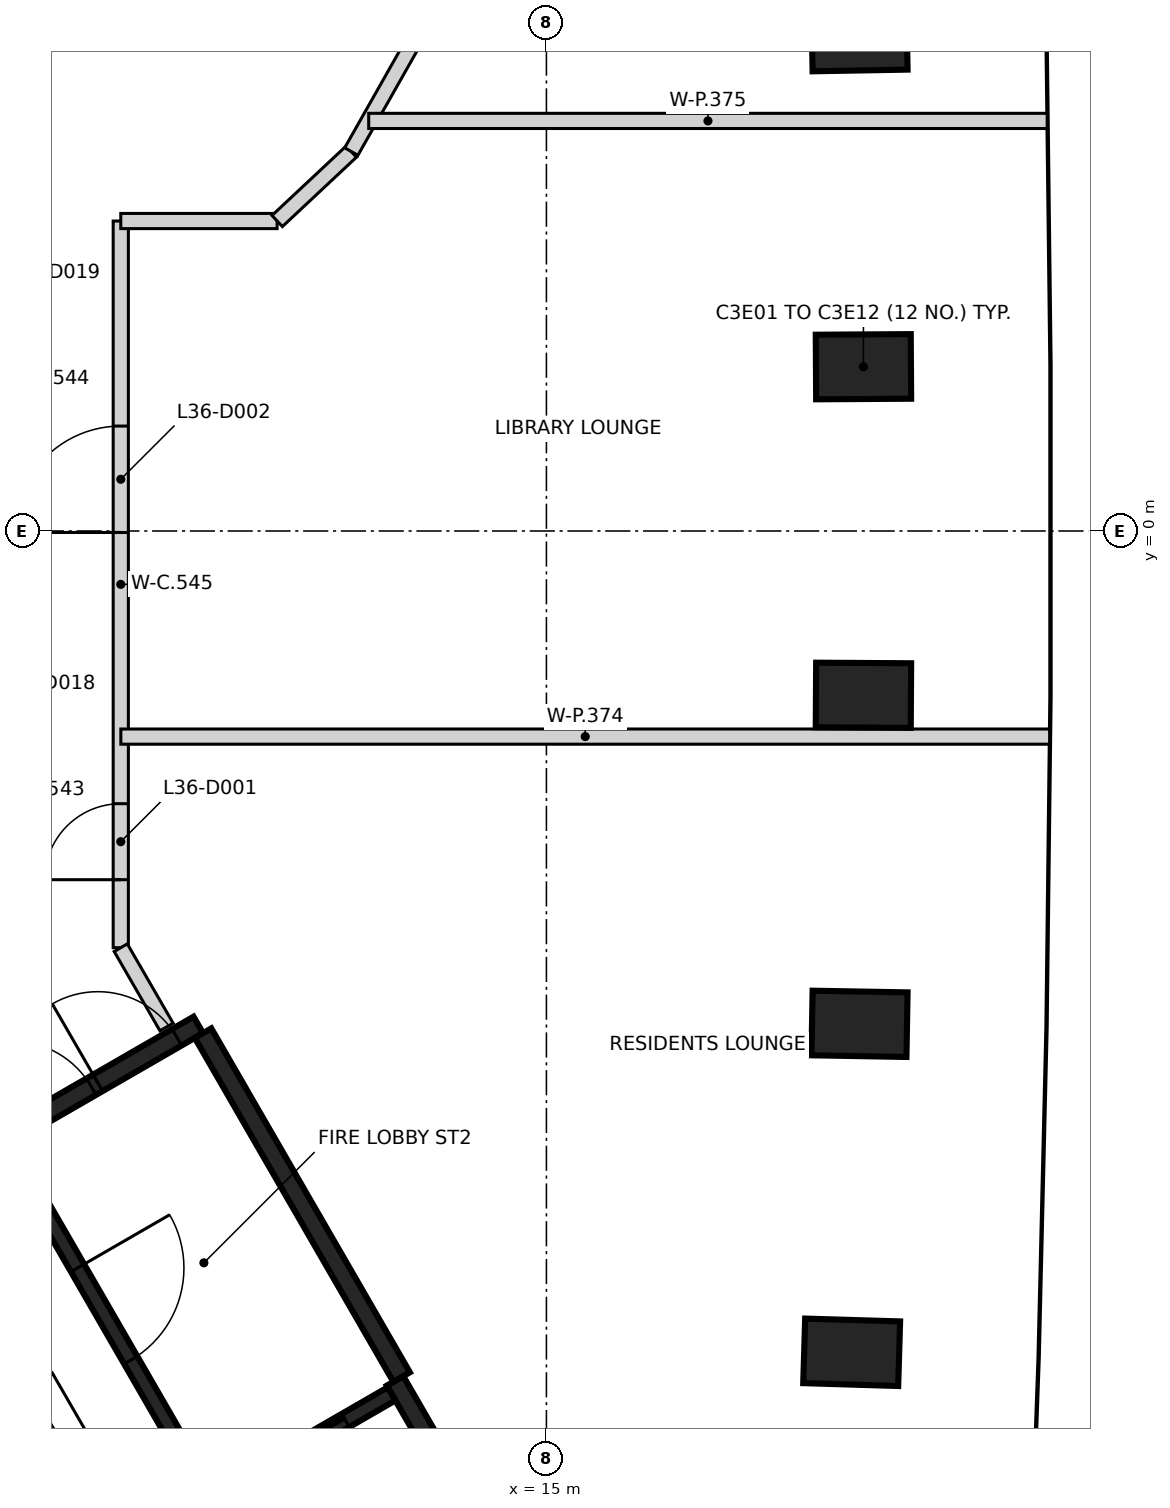
"""IFC4 building model, lengths in metres.
Left out: names, types, materials, properties, quantities, classifications, styles, units other than length and angle.
Written with IfcOpenShell. Run it as: python <this file> out.ifc"""

import sys

from ifc_helpers import new_model, si_unit, direction, frame, frame_2d, origin, origin_2d, place, context, subcontext, project, spatial, rectangle, extrude, element, fill, save


model = new_model("IFC4")
c1 = context("Model", 3, precision=1e-05, world=origin(), true_north=direction((0.0, 1.0)))
c2 = subcontext(c1, "Body", "Model", "MODEL_VIEW")
j1 = project(units=[si_unit("LENGTHUNIT", "METRE"), si_unit("PLANEANGLEUNIT", "RADIAN")], contexts=[c1])
p1 = place(None, origin())
s1 = spatial("IfcSite", under=j1, at=p1, CompositionType="ELEMENT")
p2 = place(p1, origin())
s2 = spatial("IfcBuilding", under=s1, at=p2, CompositionType="ELEMENT")
p3 = place(p2, frame((0.0, 0.0, 146.8)))
s3 = spatial("IfcBuildingStorey", under=s2, at=p3, CompositionType="ELEMENT", Elevation=146.8)
for number, where, z_axis, x_axis in (
    (1, (19.016, -10.805, -0.4), (0.0, 0.0, 1.0), (-1.0, 0.03, 0.0)),
    (2, (19.119, -6.484, -0.4), (0.0, 0.0, 1.0), (-1.0, 0.018, 0.0)),
    (3, (19.171, -2.161, -0.4), (0.0, 0.0, 1.0), (-1.0, 0.006, 0.0)),
    (4, (19.171, 2.161, -0.4), (0.0, 0.0, 1.0), (1.0, 0.006, 0.0)),
    (5, (19.119, 6.484, -0.4), (0.0, 0.0, 1.0), (1.0, 0.018, 0.0)),
):
    element("IfcColumn", number, at=place(p3, frame(where, z_axis=z_axis, x_axis=x_axis)), inside=s3, PredefinedType="COLUMN", context=c2, shape_type="SweptSolid", body=[
        extrude(rectangle(XDim=1.25, YDim=0.85, at=origin_2d()), origin(), (0.0, 0.0, 1.0), 3.6),
    ])
p4 = place(p3, frame((0.417, -12.273, 0.0), z_axis=(0.0, 0.0, 1.0), x_axis=(0.866021906294, 0.500006057782, 0.0)))
e6 = element("IfcWall", 6, at=p4, inside=s3, PredefinedType="SHEAR", context=c2, shape_type="SweptSolid", body=[
    extrude(rectangle(XDim=11.55, YDim=0.25, at=frame_2d((5.775, 0.0))), origin(), (0.0, 0.0, 1.0), 3.2),
])
p5 = place(p4, frame((10.025, 0.0, 0.0)))
e7 = element("IfcOpeningElement", 7, at=p5, cuts=e6, PredefinedType="OPENING", context=c2, shape_type="SweptSolid", body=[
    extrude(rectangle(XDim=1.2, YDim=2.1, at=frame_2d((0.6, 1.05))), frame((0.0, 0.135, 0.0), z_axis=(0.0, -1.0, 0.0), x_axis=(1.0, 0.0, 0.0)), (0.0, 0.0, 1.0), 0.27),
])
p6 = place(p4, frame((8.725, 0.0, 0.0)))
e8 = element("IfcOpeningElement", 8, at=p6, cuts=e6, PredefinedType="OPENING", context=c2, shape_type="SweptSolid", body=[
    extrude(rectangle(XDim=1.2, YDim=2.1, at=frame_2d((0.6, 1.05))), frame((0.0, 0.135, 0.0), z_axis=(0.0, -1.0, 0.0), x_axis=(1.0, 0.0, 0.0)), (0.0, 0.0, 1.0), 0.27),
])
p7 = place(p3, frame((13.008, -11.181, 0.0), z_axis=(0.0, 0.0, 1.0), x_axis=(0.500004234368, -0.866022959057, 0.0)))
e9 = element("IfcWall", 9, at=p7, inside=s3, PredefinedType="SHEAR", context=c2, shape_type="SweptSolid", body=[
    extrude(rectangle(XDim=6.25, YDim=0.25, at=frame_2d((3.125, 0.0))), origin(), (0.0, 0.0, 1.0), 3.2),
])
p8 = place(p3, frame((10.483, -6.606, 0.0), z_axis=(0.0, 0.0, 1.0), x_axis=(0.49999885962, -0.866026062182, 0.0)))
e10 = element("IfcWall", 10, at=p8, inside=s3, PredefinedType="SHEAR", context=c2, shape_type="SweptSolid", body=[
    extrude(rectangle(XDim=5.225, YDim=0.25, at=frame_2d((2.612, 0.0))), origin(), (0.0, 0.0, 1.0), 3.2),
])
p9 = place(p3, frame((7.906, -8.094, 0.0), z_axis=(0.0, 0.0, 1.0), x_axis=(0.500024287448, -0.866011380966, 0.0)))
e11 = element("IfcWall", 11, at=p9, inside=s3, PredefinedType="SHEAR", context=c2, shape_type="SweptSolid", body=[
    extrude(rectangle(XDim=5.251, YDim=0.2, at=frame_2d((2.625, 0.0))), origin(), (0.0, 0.0, 1.0), 3.2),
])
p10 = place(p9, frame((1.849, 0.0, 0.0)))
e12 = element("IfcOpeningElement", 12, at=p10, cuts=e11, PredefinedType="OPENING", context=c2, shape_type="SweptSolid", body=[
    extrude(rectangle(XDim=1.4, YDim=2.1, at=frame_2d((0.7, 1.05))), frame((0.0, 0.11, 0.0), z_axis=(0.0, -1.0, 0.0), x_axis=(1.0, 0.0, 0.0)), (0.0, 0.0, 1.0), 0.22),
])
p11 = place(p3, frame((10.587, -12.723, 0.0), z_axis=(0.0, 0.0, 1.0), x_axis=(0.866037306777, 0.499979382845, 0.0)))
e13 = element("IfcWall", 13, at=p11, inside=s3, PredefinedType="SHEAR", context=c2, shape_type="SweptSolid", body=[
    extrude(rectangle(XDim=2.742, YDim=0.2, at=frame_2d((1.371, 0.0))), origin(), (0.0, 0.0, 1.0), 3.2),
])
p12 = place(p11, frame((0.743, 0.0, 0.0)))
e14 = element("IfcOpeningElement", 14, at=p12, cuts=e13, PredefinedType="OPENING", context=c2, shape_type="SweptSolid", body=[
    extrude(rectangle(XDim=1.3, YDim=2.1, at=frame_2d((0.65, 1.05))), frame((0.0, 0.11, 0.0), z_axis=(0.0, -1.0, 0.0), x_axis=(1.0, 0.0, 0.0)), (0.0, 0.0, 1.0), 0.22),
])
p13 = place(p3, frame((9.4, -5.482, 0.0), z_axis=(0.0, 0.0, 1.0), x_axis=(0.0, 1.0, 0.0)))
e15 = element("IfcWall", 15, at=p13, inside=s3, PredefinedType="PARTITIONING", context=c2, shape_type="SweptSolid", body=[
    extrude(rectangle(XDim=9.56, YDim=0.2, at=frame_2d((4.78, 0.0))), origin(), (0.0, 0.0, 1.0), 3.2),
])
p14 = place(p13, frame((0.895, 0.0, 0.0)))
e16 = element("IfcOpeningElement", 16, at=p14, cuts=e15, PredefinedType="OPENING", context=c2, shape_type="SweptSolid", body=[
    extrude(rectangle(XDim=1.0, YDim=2.1, at=frame_2d((0.5, 1.05))), frame((0.0, 0.11, 0.0), z_axis=(0.0, -1.0, 0.0), x_axis=(1.0, 0.0, 0.0)), (0.0, 0.0, 1.0), 0.22),
])
p15 = place(p13, frame((5.462, 0.0, 0.0)))
e17 = element("IfcOpeningElement", 17, at=p15, cuts=e15, PredefinedType="OPENING", context=c2, shape_type="SweptSolid", body=[
    extrude(rectangle(XDim=1.4, YDim=2.1, at=frame_2d((0.7, 1.05))), frame((0.0, 0.11, 0.0), z_axis=(0.0, -1.0, 0.0), x_axis=(1.0, 0.0, 0.0)), (0.0, 0.0, 1.0), 0.22),
])
p16 = place(p3, frame((9.4, -5.482, 0.0), z_axis=(0.0, 0.0, 1.0), x_axis=(0.499909562097, -0.866077611837, 0.0)))
e18 = element("IfcWall", 18, at=p16, inside=s3, PredefinedType="PARTITIONING", context=c2, shape_type="SweptSolid", body=[
    extrude(rectangle(XDim=1.205, YDim=0.2, at=frame_2d((0.603, 0.0))), origin(), (0.0, 0.0, 1.0), 3.2),
])
p17 = place(p3, frame((9.4, 4.078, 0.0), z_axis=(0.0, 0.0, 1.0), x_axis=(1.0, 0.0, 0.0)))
e19 = element("IfcWall", 19, at=p17, inside=s3, PredefinedType="PARTITIONING", context=c2, shape_type="SweptSolid", body=[
    extrude(rectangle(XDim=2.057, YDim=0.2, at=frame_2d((1.029, 0.0))), origin(), (0.0, 0.0, 1.0), 3.2),
])
p18 = place(p3, frame((11.458, 4.078, 0.0), z_axis=(0.0, 0.0, 1.0), x_axis=(0.729936032318, 0.683515463412, 0.0)))
e20 = element("IfcWall", 20, at=p18, inside=s3, PredefinedType="PARTITIONING", context=c2, shape_type="SweptSolid", body=[
    extrude(rectangle(XDim=1.336, YDim=0.2, at=frame_2d((0.668, 0.0))), origin(), (0.0, 0.0, 1.0), 3.2),
])
p19 = place(p3, frame((12.433, 4.992, 0.0), z_axis=(0.0, 0.0, 1.0), x_axis=(0.492740203499, 0.870176471675, 0.0)))
e21 = element("IfcWall", 21, at=p19, inside=s3, PredefinedType="PARTITIONING", context=c2, shape_type="SweptSolid", body=[
    extrude(rectangle(XDim=6.265, YDim=0.2, at=frame_2d((3.133, 0.0))), origin(), (0.0, 0.0, 1.0), 3.2),
])
p20 = place(p19, frame((2.858, 0.0, 0.0)))
e22 = element("IfcOpeningElement", 22, at=p20, cuts=e21, PredefinedType="OPENING", context=c2, shape_type="SweptSolid", body=[
    extrude(rectangle(XDim=1.0, YDim=2.1, at=frame_2d((0.5, 1.05))), frame((0.0, 0.11, 0.0), z_axis=(0.0, -1.0, 0.0), x_axis=(1.0, 0.0, 0.0)), (0.0, 0.0, 1.0), 0.22),
])
p21 = place(p3, frame((9.401, -2.705, 0.0), z_axis=(0.0, 0.0, 1.0), x_axis=(1.0, 0.0, 0.0)))
e23 = element("IfcWall", 23, at=p21, inside=s3, PredefinedType="PARTITIONING", context=c2, shape_type="SweptSolid", body=[
    extrude(rectangle(XDim=12.219, YDim=0.2, at=frame_2d((6.11, 0.0))), origin(), (0.0, 0.0, 1.0), 2.3),
])
p22 = place(p3, frame((12.662, 5.395, 0.0), z_axis=(0.0, 0.0, 1.0), x_axis=(1.0, 0.0, 0.0)))
e24 = element("IfcWall", 24, at=p22, inside=s3, PredefinedType="PARTITIONING", context=c2, shape_type="SweptSolid", body=[
    extrude(rectangle(XDim=8.926, YDim=0.2, at=frame_2d((4.463, 0.0))), origin(), (0.0, 0.0, 1.0), 2.3),
])
p23 = place(p12, origin())
e25 = element("IfcDoor", 25, at=p23, inside=s3, OperationType="SLIDING_TO_LEFT", PredefinedType="DOOR", context=c2, shape_type="SweptSolid", body=[
    extrude(rectangle(XDim=1.3, YDim=2.1, at=frame_2d((0.65, 1.05))), frame((0.0, 0.025, 0.0), z_axis=(0.0, -1.0, 0.0), x_axis=(1.0, 0.0, 0.0)), (0.0, 0.0, 1.0), 0.05),
])
fill(e14, e25)
p24 = place(p5, origin())
e26 = element("IfcDoor", 26, at=p24, inside=s3, OperationType="SINGLE_SWING_LEFT", PredefinedType="DOOR", context=c2, shape_type="SweptSolid", body=[
    extrude(rectangle(XDim=1.2, YDim=2.1, at=frame_2d((0.6, 1.05))), frame((0.0, 0.025, 0.0), z_axis=(0.0, -1.0, 0.0), x_axis=(1.0, 0.0, 0.0)), (0.0, 0.0, 1.0), 0.05),
])
fill(e7, e26)
p25 = place(p6, origin())
e27 = element("IfcDoor", 27, at=p25, inside=s3, OperationType="SINGLE_SWING_RIGHT", PredefinedType="DOOR", context=c2, shape_type="SweptSolid", body=[
    extrude(rectangle(XDim=1.2, YDim=2.1, at=frame_2d((0.6, 1.05))), frame((0.0, 0.025, 0.0), z_axis=(0.0, -1.0, 0.0), x_axis=(1.0, 0.0, 0.0)), (0.0, 0.0, 1.0), 0.05),
])
fill(e8, e27)
p26 = place(p10, origin())
e28 = element("IfcDoor", 28, at=p26, inside=s3, OperationType="SINGLE_SWING_LEFT", PredefinedType="DOOR", context=c2, shape_type="SweptSolid", body=[
    extrude(rectangle(XDim=1.4, YDim=2.1, at=frame_2d((0.7, 1.05))), frame((0.0, 0.025, 0.0), z_axis=(0.0, -1.0, 0.0), x_axis=(1.0, 0.0, 0.0)), (0.0, 0.0, 1.0), 0.05),
])
fill(e12, e28)
p27 = place(p14, frame((1.0, 0.0, 0.0), z_axis=(0.0, 0.0, 1.0), x_axis=(-1.0, 0.0, 0.0)))
e29 = element("IfcDoor", 29, at=p27, inside=s3, OperationType="SINGLE_SWING_LEFT", PredefinedType="DOOR", context=c2, shape_type="SweptSolid", body=[
    extrude(rectangle(XDim=1.0, YDim=2.1, at=frame_2d((0.5, 1.05))), frame((0.0, 0.025, 0.0), z_axis=(0.0, -1.0, 0.0), x_axis=(1.0, 0.0, 0.0)), (0.0, 0.0, 1.0), 0.05),
])
fill(e16, e29)
p28 = place(p15, frame((1.4, 0.0, 0.0), z_axis=(0.0, 0.0, 1.0), x_axis=(-1.0, 0.0, 0.0)))
e30 = element("IfcDoor", 30, at=p28, inside=s3, OperationType="DOUBLE_DOOR_SINGLE_SWING", PredefinedType="DOOR", context=c2, shape_type="SweptSolid", body=[
    extrude(rectangle(XDim=1.4, YDim=2.1, at=frame_2d((0.7, 1.05))), frame((0.0, 0.025, 0.0), z_axis=(0.0, -1.0, 0.0), x_axis=(1.0, 0.0, 0.0)), (0.0, 0.0, 1.0), 0.05),
])
fill(e17, e30)
save(model, sys.argv[1])
